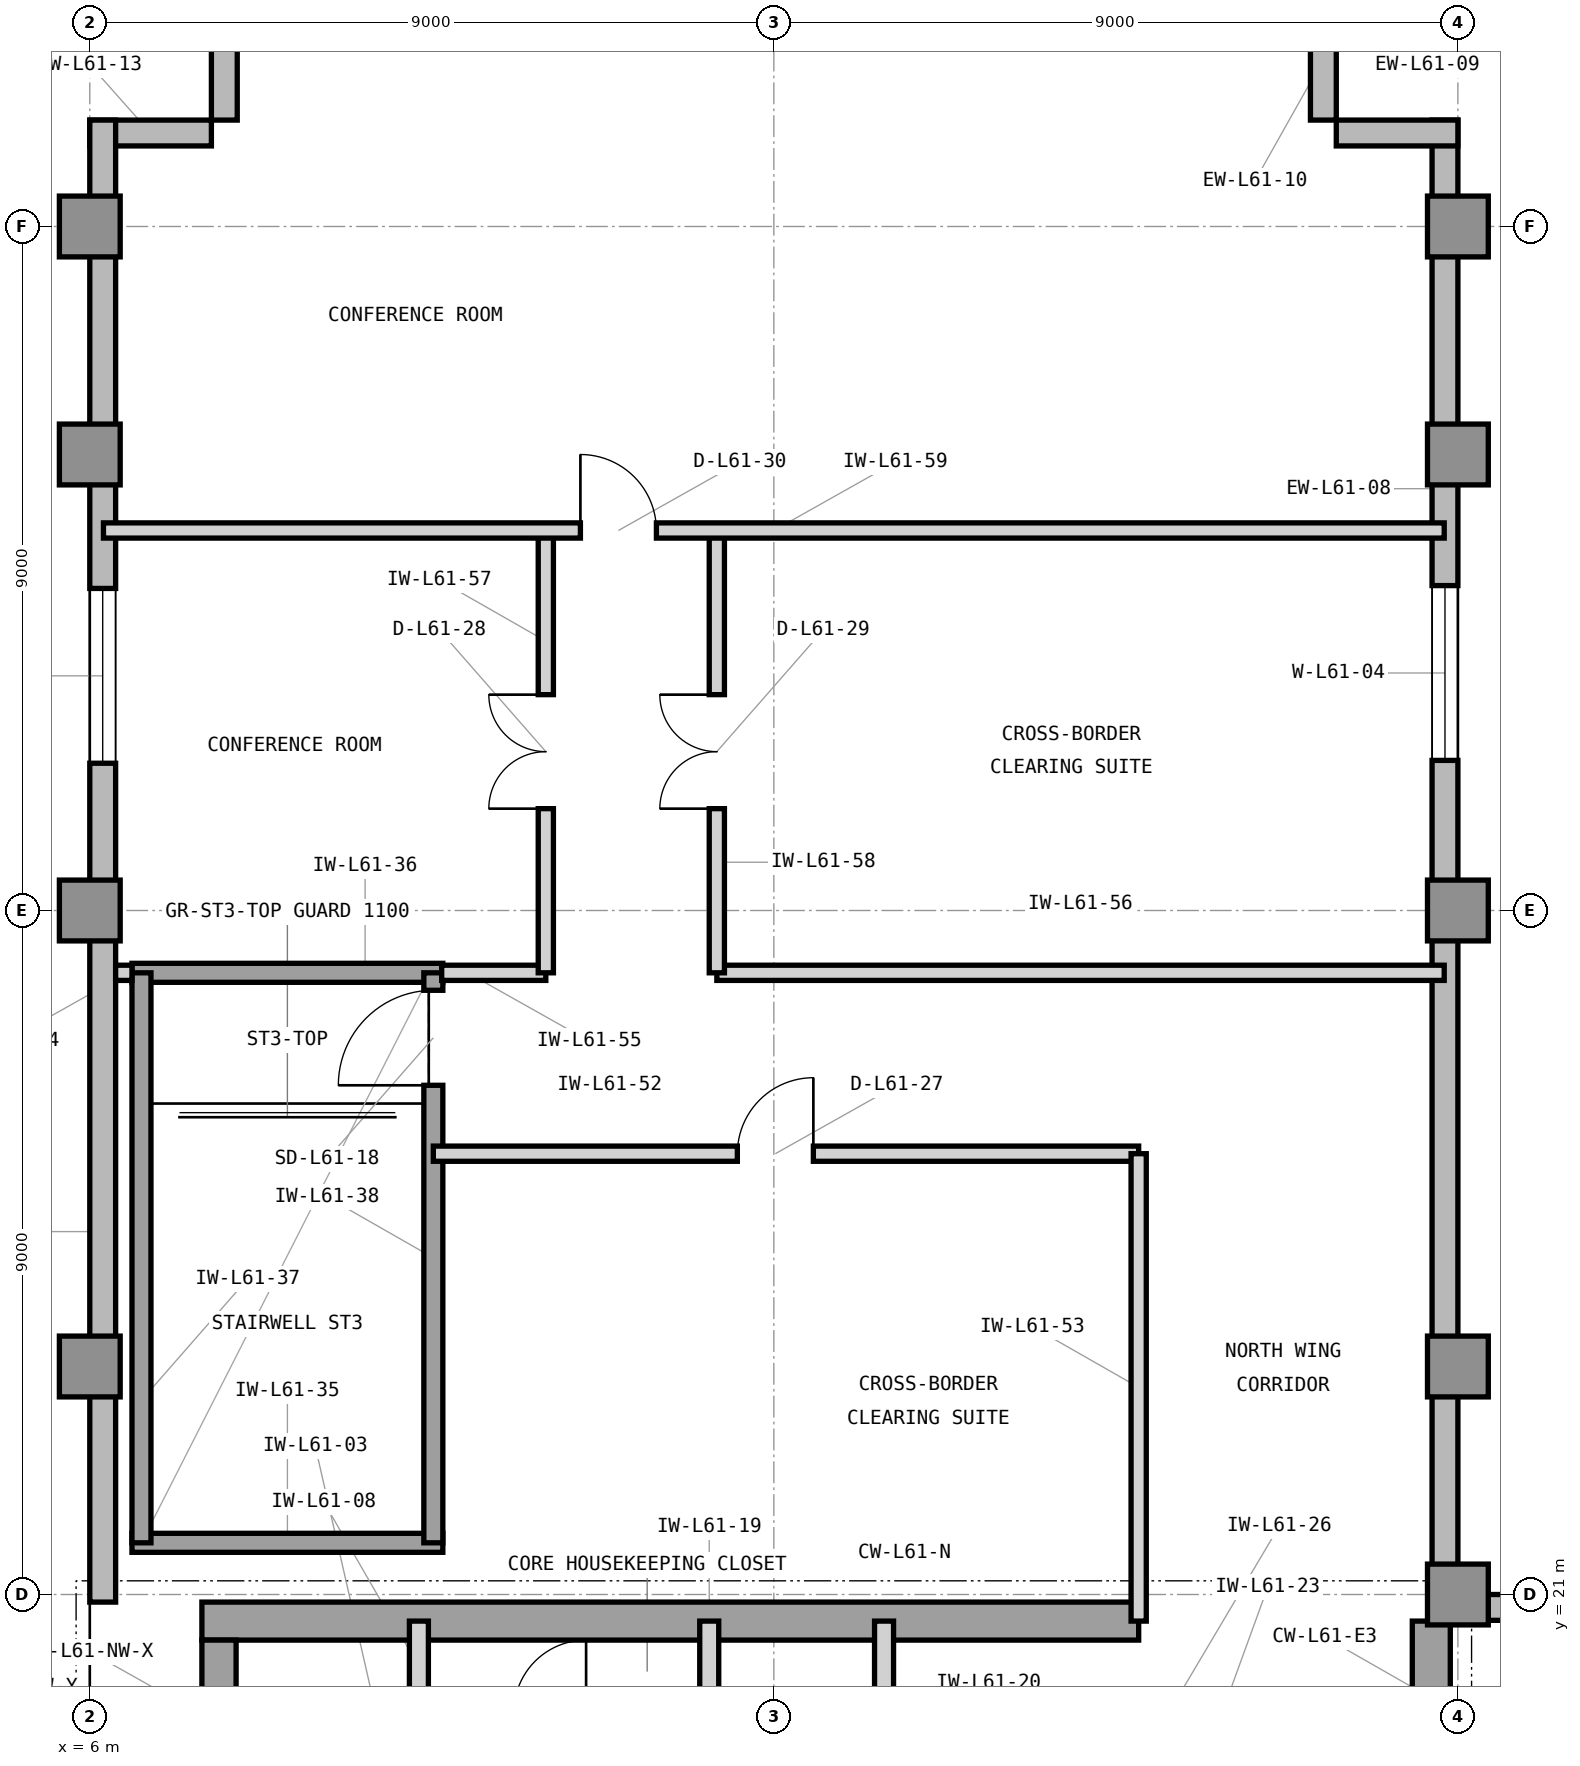
"""IFC4 building model, lengths in metres.
Left out: names, types, materials, properties, quantities, classifications, styles, units other than length and angle.
Written with IfcOpenShell. Run it as: python <this file> out.ifc"""

import sys

from ifc_helpers import new_model, si_unit, direction, frame, frame_2d, origin, origin_2d, place, context, subcontext, project, spatial, rectangle, extrude, element, fill, save


model = new_model("IFC4")
c1 = context("Model", 3, precision=1e-05, world=origin(), true_north=direction((0.0, 1.0)))
c2 = subcontext(c1, "Body", "Model", "MODEL_VIEW")
j1 = project(units=[si_unit("LENGTHUNIT", "METRE"), si_unit("PLANEANGLEUNIT", "RADIAN")], contexts=[c1])
p1 = place(None, origin())
s1 = spatial("IfcSite", under=j1, at=p1, CompositionType="ELEMENT")
p2 = place(p1, origin())
s2 = spatial("IfcBuilding", under=s1, at=p2, CompositionType="ELEMENT")
p3 = place(p2, frame((0.0, 0.0, 250.8)))
s3 = spatial("IfcBuildingStorey", under=s2, at=p3, CompositionType="ELEMENT", Elevation=250.8)
p4 = place(p3, frame((7.475, 20.65, 0.0), z_axis=(0.0, 0.0, 1.0), x_axis=(1.0, 0.0, 0.0)))
e1 = element("IfcWall", 1, at=p4, inside=s3, PredefinedType="SHEAR", context=c2, shape_type="SweptSolid", body=[
    extrude(rectangle(XDim=12.325, YDim=0.5, at=frame_2d((6.163, 0.0))), origin(), (0.0, 0.0, 1.0), 3.9),
])
p5 = place(p3, frame((23.65, 16.6, 0.0), z_axis=(0.0, 0.0, 1.0), x_axis=(0.0, 1.0, 0.0)))
e2 = element("IfcWall", 2, at=p5, inside=s3, PredefinedType="SHEAR", context=c2, shape_type="SweptSolid", body=[
    extrude(rectangle(XDim=4.05, YDim=0.5, at=frame_2d((2.025, 0.0))), origin(), (0.0, 0.0, 1.0), 3.9),
])
p6 = place(p3, frame((7.7, 19.575, 0.0), z_axis=(0.0, 0.0, 1.0), x_axis=(0.0, 1.0, 0.0)))
e3 = element("IfcWall", 3, at=p6, inside=s3, PredefinedType="SHEAR", context=c2, shape_type="SweptSolid", body=[
    extrude(rectangle(XDim=0.825, YDim=0.45, at=frame_2d((0.413, 0.0))), origin(), (0.0, 0.0, 1.0), 3.9),
])
for number, where, z_axis, x_axis in (
    (4, (24.0, 21.0, 0.0), (0.0, 0.0, 1.0), (1.0, 0.0, 0.0)),
    (5, (6.0, 24.0, 0.0), (0.0, 0.0, 1.0), (1.0, 0.0, 0.0)),
    (6, (24.0, 24.0, 0.0), (0.0, 0.0, 1.0), (1.0, 0.0, 0.0)),
    (7, (6.0, 30.0, 0.0), (0.0, 0.0, 1.0), (1.0, 0.0, 0.0)),
    (8, (24.0, 30.0, 0.0), (0.0, 0.0, 1.0), (1.0, 0.0, 0.0)),
    (9, (6.0, 36.0, 0.0), (0.0, 0.0, 1.0), (1.0, 0.0, 0.0)),
    (10, (24.0, 36.0, 0.0), (0.0, 0.0, 1.0), (1.0, 0.0, 0.0)),
    (11, (6.0, 39.0, 0.0), (0.0, 0.0, 1.0), (1.0, 0.0, 0.0)),
    (12, (24.0, 39.0, 0.0), (0.0, 0.0, 1.0), (1.0, 0.0, 0.0)),
):
    element("IfcColumn", number, at=place(p3, frame(where, z_axis=z_axis, x_axis=x_axis)), inside=s3, PredefinedType="COLUMN", context=c2, shape_type="SweptSolid", body=[
        extrude(rectangle(XDim=0.8, YDim=0.8, at=origin_2d()), origin(), (0.0, 0.0, 1.0), 3.9),
    ])
p7 = place(p3, frame((52.4, 20.83, 0.0), z_axis=(0.0, 0.0, 1.0), x_axis=(-1.0, 0.0, 0.0)))
e13 = element("IfcWall", 13, at=p7, inside=s3, PredefinedType="STANDARD", context=c2, shape_type="SweptSolid", body=[
    extrude(rectangle(XDim=28.4, YDim=0.34, at=frame_2d((14.2, 0.0))), origin(), (0.0, 0.0, 1.0), 3.715),
])
p8 = place(p7, frame((26.096, 0.0, 0.9)))
e14 = element("IfcOpeningElement", 14, at=p8, cuts=e13, PredefinedType="OPENING", context=c2, shape_type="SweptSolid", body=[
    extrude(rectangle(XDim=1.6, YDim=2.2, at=frame_2d((0.8, 1.1))), frame((0.0, 0.18, 0.0), z_axis=(0.0, -1.0, 0.0), x_axis=(1.0, 0.0, 0.0)), (0.0, 0.0, 1.0), 0.36),
])
p9 = place(p7, frame((11.375, 0.0, 0.9)))
e15 = element("IfcOpeningElement", 15, at=p9, cuts=e13, PredefinedType="OPENING", context=c2, shape_type="SweptSolid", body=[
    extrude(rectangle(XDim=2.3, YDim=2.2, at=frame_2d((1.15, 1.1))), frame((0.0, 0.18, 0.0), z_axis=(0.0, -1.0, 0.0), x_axis=(1.0, 0.0, 0.0)), (0.0, 0.0, 1.0), 0.36),
])
p10 = place(p3, frame((23.83, 21.0, 0.0), z_axis=(0.0, 0.0, 1.0), x_axis=(0.0, 1.0, 0.0)))
e16 = element("IfcWall", 16, at=p10, inside=s3, PredefinedType="STANDARD", context=c2, shape_type="SweptSolid", body=[
    extrude(rectangle(XDim=19.4, YDim=0.34, at=frame_2d((9.7, 0.0))), origin(), (0.0, 0.0, 1.0), 3.715),
])
p11 = place(p10, frame((10.975, 0.0, 0.9)))
e17 = element("IfcOpeningElement", 17, at=p11, cuts=e16, PredefinedType="OPENING", context=c2, shape_type="SweptSolid", body=[
    extrude(rectangle(XDim=2.3, YDim=2.2, at=frame_2d((1.15, 1.1))), frame((0.0, 0.18, 0.0), z_axis=(0.0, -1.0, 0.0), x_axis=(1.0, 0.0, 0.0)), (0.0, 0.0, 1.0), 0.36),
])
for number, where, z_axis, x_axis in (
    (18, (24.0, 40.23, 0.0), (0.0, 0.0, 1.0), (-1.0, 0.0, 0.0)),
    (19, (22.23, 40.4, 0.0), (0.0, 0.0, 1.0), (0.0, 1.0, 0.0)),
    (20, (7.77, 42.0, 0.0), (0.0, 0.0, 1.0), (0.0, -1.0, 0.0)),
    (21, (7.6, 40.23, 0.0), (0.0, 0.0, 1.0), (-1.0, 0.0, 0.0)),
):
    element("IfcWall", number, at=place(p3, frame(where, z_axis=z_axis, x_axis=x_axis)), inside=s3, PredefinedType="STANDARD", context=c2, shape_type="SweptSolid", body=[
        extrude(rectangle(XDim=1.6, YDim=0.34, at=frame_2d((0.8, 0.0))), origin(), (0.0, 0.0, 1.0), 3.715),
    ])
p12 = place(p3, frame((6.17, 40.4, 0.0), z_axis=(0.0, 0.0, 1.0), x_axis=(0.0, -1.0, 0.0)))
e22 = element("IfcWall", 22, at=p12, inside=s3, PredefinedType="STANDARD", context=c2, shape_type="SweptSolid", body=[
    extrude(rectangle(XDim=19.5, YDim=0.34, at=frame_2d((9.75, 0.0))), origin(), (0.0, 0.0, 1.0), 3.715),
])
p13 = place(p12, frame((6.163, 0.0, 0.9)))
e23 = element("IfcOpeningElement", 23, at=p13, cuts=e22, PredefinedType="OPENING", context=c2, shape_type="SweptSolid", body=[
    extrude(rectangle(XDim=2.3, YDim=2.2, at=frame_2d((1.15, 1.1))), frame((0.0, 0.18, 0.0), z_axis=(0.0, -1.0, 0.0), x_axis=(1.0, 0.0, 0.0)), (0.0, 0.0, 1.0), 0.36),
])
p14 = place(p3, frame((10.33, 19.45, 0.0), z_axis=(0.0, 0.0, 1.0), x_axis=(0.0, 1.0, 0.0)))
e24 = element("IfcWall", 24, at=p14, inside=s3, PredefinedType="PARTITIONING", context=c2, shape_type="SweptSolid", body=[
    extrude(rectangle(XDim=1.2, YDim=0.25, at=frame_2d((0.6, 0.0))), origin(), (0.0, 0.0, 1.0), 3.63),
])
for number, where, z_axis, x_axis in (
    (25, (14.15, 16.7, 0.0), (0.0, 0.0, 1.0), (0.0, 1.0, 0.0)),
    (26, (16.45, 16.7, 0.0), (0.0, 0.0, 1.0), (0.0, 1.0, 0.0)),
):
    element("IfcWall", number, at=place(p3, frame(where, z_axis=z_axis, x_axis=x_axis)), inside=s3, PredefinedType="PARTITIONING", context=c2, shape_type="SweptSolid", body=[
        extrude(rectangle(XDim=3.95, YDim=0.25, at=frame_2d((1.975, 0.0))), origin(), (0.0, 0.0, 1.0), 3.63),
    ])
for number, where, z_axis, x_axis in (
    (27, (6.555, 21.68, 0.0), (0.0, 0.0, 1.0), (1.0, 0.0, 0.0)),
    (28, (6.555, 29.18, 0.0), (0.0, 0.0, 1.0), (1.0, 0.0, 0.0)),
):
    element("IfcWall", number, at=place(p3, frame(where, z_axis=z_axis, x_axis=x_axis)), inside=s3, PredefinedType="SHEAR", context=c2, shape_type="SweptSolid", body=[
        extrude(rectangle(XDim=4.09, YDim=0.25, at=frame_2d((2.045, 0.0))), origin(), (0.0, 0.0, 1.0), 3.9),
    ])
p15 = place(p3, frame((6.68, 21.68, 0.0), z_axis=(0.0, 0.0, 1.0), x_axis=(0.0, 1.0, 0.0)))
e29 = element("IfcWall", 29, at=p15, inside=s3, PredefinedType="SHEAR", context=c2, shape_type="SweptSolid", body=[
    extrude(rectangle(XDim=7.5, YDim=0.25, at=frame_2d((3.75, 0.0))), origin(), (0.0, 0.0, 1.0), 3.9),
])
p16 = place(p3, frame((10.52, 21.68, 0.0), z_axis=(0.0, 0.0, 1.0), x_axis=(0.0, 1.0, 0.0)))
e30 = element("IfcWall", 30, at=p16, inside=s3, PredefinedType="SHEAR", context=c2, shape_type="SweptSolid", body=[
    extrude(rectangle(XDim=7.5, YDim=0.25, at=frame_2d((3.75, 0.0))), origin(), (0.0, 0.0, 1.0), 3.9),
])
p17 = place(p16, frame((6.02, 0.0, 0.0)))
e31 = element("IfcOpeningElement", 31, at=p17, cuts=e30, PredefinedType="OPENING", context=c2, shape_type="SweptSolid", body=[
    extrude(rectangle(XDim=1.25, YDim=2.2, at=frame_2d((0.625, 1.1))), frame((0.0, 0.135, 0.0), z_axis=(0.0, -1.0, 0.0), x_axis=(1.0, 0.0, 0.0)), (0.0, 0.0, 1.0), 0.27),
])
p18 = place(p3, frame((10.52, 26.8, 0.0), z_axis=(0.0, 0.0, 1.0), x_axis=(1.0, 0.0, 0.0)))
e32 = element("IfcWall", 32, at=p18, inside=s3, PredefinedType="PARTITIONING", context=c2, shape_type="SweptSolid", body=[
    extrude(rectangle(XDim=9.28, YDim=0.2, at=frame_2d((4.64, 0.0))), origin(), (0.0, 0.0, 1.0), 3.63),
])
p19 = place(p18, frame((4.0, 0.0, 0.0)))
e33 = element("IfcOpeningElement", 33, at=p19, cuts=e32, PredefinedType="OPENING", context=c2, shape_type="SweptSolid", body=[
    extrude(rectangle(XDim=1.0, YDim=2.15, at=frame_2d((0.5, 1.075))), frame((0.0, 0.11, 0.0), z_axis=(0.0, -1.0, 0.0), x_axis=(1.0, 0.0, 0.0)), (0.0, 0.0, 1.0), 0.22),
])
p20 = place(p3, frame((19.8, 20.65, 0.0), z_axis=(0.0, 0.0, 1.0), x_axis=(0.0, 1.0, 0.0)))
e34 = element("IfcWall", 34, at=p20, inside=s3, PredefinedType="PARTITIONING", context=c2, shape_type="SweptSolid", body=[
    extrude(rectangle(XDim=6.15, YDim=0.2, at=frame_2d((3.075, 0.0))), origin(), (0.0, 0.0, 1.0), 3.63),
])
p21 = place(p3, frame((6.34, 29.18, 0.0), z_axis=(0.0, 0.0, 1.0), x_axis=(1.0, 0.0, 0.0)))
e35 = element("IfcWall", 35, at=p21, inside=s3, PredefinedType="PARTITIONING", context=c2, shape_type="SweptSolid", body=[
    extrude(rectangle(XDim=0.215, YDim=0.2, at=frame_2d((0.107, 0.0))), origin(), (0.0, 0.0, 1.0), 3.63),
])
p22 = place(p3, frame((10.63, 29.18, 0.0), z_axis=(0.0, 0.0, 1.0), x_axis=(1.0, 0.0, 0.0)))
e36 = element("IfcWall", 36, at=p22, inside=s3, PredefinedType="PARTITIONING", context=c2, shape_type="SweptSolid", body=[
    extrude(rectangle(XDim=1.37, YDim=0.2, at=frame_2d((0.685, 0.0))), origin(), (0.0, 0.0, 1.0), 3.63),
])
p23 = place(p3, frame((14.25, 29.18, 0.0), z_axis=(0.0, 0.0, 1.0), x_axis=(1.0, 0.0, 0.0)))
e37 = element("IfcWall", 37, at=p23, inside=s3, PredefinedType="PARTITIONING", context=c2, shape_type="SweptSolid", body=[
    extrude(rectangle(XDim=9.57, YDim=0.2, at=frame_2d((4.785, 0.0))), origin(), (0.0, 0.0, 1.0), 3.63),
])
p24 = place(p3, frame((12.0, 29.18, 0.0), z_axis=(0.0, 0.0, 1.0), x_axis=(0.0, 1.0, 0.0)))
e38 = element("IfcWall", 38, at=p24, inside=s3, PredefinedType="PARTITIONING", context=c2, shape_type="SweptSolid", body=[
    extrude(rectangle(XDim=5.82, YDim=0.2, at=frame_2d((2.91, 0.0))), origin(), (0.0, 0.0, 1.0), 3.63),
])
p25 = place(p24, frame((2.16, 0.0, 0.0)))
e39 = element("IfcOpeningElement", 39, at=p25, cuts=e38, PredefinedType="OPENING", context=c2, shape_type="SweptSolid", body=[
    extrude(rectangle(XDim=1.5, YDim=2.3, at=frame_2d((0.75, 1.15))), frame((0.0, 0.11, 0.0), z_axis=(0.0, -1.0, 0.0), x_axis=(1.0, 0.0, 0.0)), (0.0, 0.0, 1.0), 0.22),
])
p26 = place(p3, frame((14.25, 29.18, 0.0), z_axis=(0.0, 0.0, 1.0), x_axis=(0.0, 1.0, 0.0)))
e40 = element("IfcWall", 40, at=p26, inside=s3, PredefinedType="PARTITIONING", context=c2, shape_type="SweptSolid", body=[
    extrude(rectangle(XDim=5.82, YDim=0.2, at=frame_2d((2.91, 0.0))), origin(), (0.0, 0.0, 1.0), 3.63),
])
p27 = place(p26, frame((2.16, 0.0, 0.0)))
e41 = element("IfcOpeningElement", 41, at=p27, cuts=e40, PredefinedType="OPENING", context=c2, shape_type="SweptSolid", body=[
    extrude(rectangle(XDim=1.5, YDim=2.3, at=frame_2d((0.75, 1.15))), frame((0.0, 0.11, 0.0), z_axis=(0.0, -1.0, 0.0), x_axis=(1.0, 0.0, 0.0)), (0.0, 0.0, 1.0), 0.22),
])
p28 = place(p3, frame((6.18, 35.0, 0.0), z_axis=(0.0, 0.0, 1.0), x_axis=(1.0, 0.0, 0.0)))
e42 = element("IfcWall", 42, at=p28, inside=s3, PredefinedType="PARTITIONING", context=c2, shape_type="SweptSolid", body=[
    extrude(rectangle(XDim=17.64, YDim=0.2, at=frame_2d((8.82, 0.0))), origin(), (0.0, 0.0, 1.0), 3.63),
])
p29 = place(p28, frame((6.275, 0.0, 0.0)))
e43 = element("IfcOpeningElement", 43, at=p29, cuts=e42, PredefinedType="OPENING", context=c2, shape_type="SweptSolid", body=[
    extrude(rectangle(XDim=1.0, YDim=2.15, at=frame_2d((0.5, 1.075))), frame((0.0, 0.11, 0.0), z_axis=(0.0, -1.0, 0.0), x_axis=(1.0, 0.0, 0.0)), (0.0, 0.0, 1.0), 0.22),
])
p30 = place(p11, origin())
e44 = element("IfcWindow", 44, at=p30, inside=s3, PartitioningType="SINGLE_PANEL", PredefinedType="WINDOW", context=c2, shape_type="SweptSolid", body=[
    extrude(rectangle(XDim=2.3, YDim=2.2, at=frame_2d((1.15, 1.1))), frame((0.0, 0.11, 0.0), z_axis=(0.0, -1.0, 0.0), x_axis=(1.0, 0.0, 0.0)), (0.0, 0.0, 1.0), 0.06),
])
fill(e17, e44)
p31 = place(p13, origin())
e45 = element("IfcWindow", 45, at=p31, inside=s3, PartitioningType="SINGLE_PANEL", PredefinedType="WINDOW", context=c2, shape_type="SweptSolid", body=[
    extrude(rectangle(XDim=2.3, YDim=2.2, at=frame_2d((1.15, 1.1))), frame((0.0, 0.11, 0.0), z_axis=(0.0, -1.0, 0.0), x_axis=(1.0, 0.0, 0.0)), (0.0, 0.0, 1.0), 0.06),
])
fill(e23, e45)
p32 = place(p17, origin())
e46 = element("IfcDoor", 46, at=p32, inside=s3, OperationType="SINGLE_SWING_LEFT", PredefinedType="DOOR", context=c2, shape_type="SweptSolid", body=[
    extrude(rectangle(XDim=1.25, YDim=2.2, at=frame_2d((0.625, 1.1))), frame((0.0, 0.025, 0.0), z_axis=(0.0, -1.0, 0.0), x_axis=(1.0, 0.0, 0.0)), (0.0, 0.0, 1.0), 0.05),
])
fill(e31, e46)
p33 = place(p19, origin())
e47 = element("IfcDoor", 47, at=p33, inside=s3, OperationType="SINGLE_SWING_RIGHT", PredefinedType="DOOR", context=c2, shape_type="SweptSolid", body=[
    extrude(rectangle(XDim=1.0, YDim=2.15, at=frame_2d((0.5, 1.075))), frame((0.0, 0.025, 0.0), z_axis=(0.0, -1.0, 0.0), x_axis=(1.0, 0.0, 0.0)), (0.0, 0.0, 1.0), 0.05),
])
fill(e33, e47)
p34 = place(p25, origin())
e48 = element("IfcDoor", 48, at=p34, inside=s3, OperationType="DOUBLE_DOOR_SINGLE_SWING", PredefinedType="DOOR", context=c2, shape_type="SweptSolid", body=[
    extrude(rectangle(XDim=1.5, YDim=2.3, at=frame_2d((0.75, 1.15))), frame((0.0, 0.025, 0.0), z_axis=(0.0, -1.0, 0.0), x_axis=(1.0, 0.0, 0.0)), (0.0, 0.0, 1.0), 0.05),
])
fill(e39, e48)
p35 = place(p27, origin())
e49 = element("IfcDoor", 49, at=p35, inside=s3, OperationType="DOUBLE_DOOR_SINGLE_SWING", PredefinedType="DOOR", context=c2, shape_type="SweptSolid", body=[
    extrude(rectangle(XDim=1.5, YDim=2.3, at=frame_2d((0.75, 1.15))), frame((0.0, 0.025, 0.0), z_axis=(0.0, -1.0, 0.0), x_axis=(1.0, 0.0, 0.0)), (0.0, 0.0, 1.0), 0.05),
])
fill(e41, e49)
p36 = place(p29, origin())
e50 = element("IfcDoor", 50, at=p36, inside=s3, OperationType="SINGLE_SWING_LEFT", PredefinedType="DOOR", context=c2, shape_type="SweptSolid", body=[
    extrude(rectangle(XDim=1.0, YDim=2.15, at=frame_2d((0.5, 1.075))), frame((0.0, 0.025, 0.0), z_axis=(0.0, -1.0, 0.0), x_axis=(1.0, 0.0, 0.0)), (0.0, 0.0, 1.0), 0.05),
])
fill(e43, e50)
save(model, sys.argv[1])
